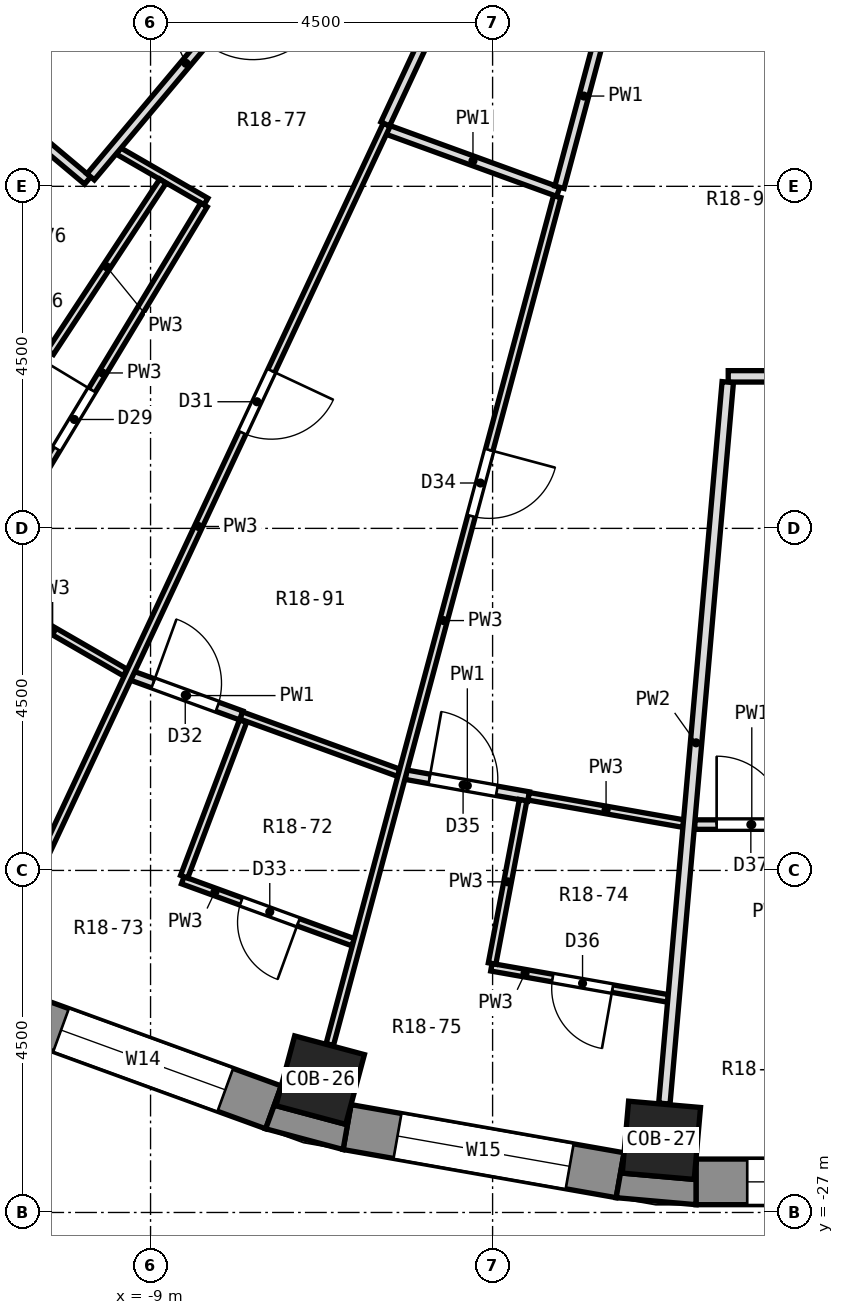
"""IFC4 building model, lengths in metres.
Left out: names, types, materials, properties, quantities, classifications, styles, units other than length and angle.
Written with IfcOpenShell. Run it as: python <this file> out.ifc"""

import sys

from ifc_helpers import new_model, si_unit, direction, frame, frame_2d, origin, origin_2d, place, context, subcontext, project, spatial, polyline, rectangle, outline, extrude, element, fill, save


model = new_model("IFC4")
c1 = context("Model", 3, precision=1e-05, world=origin(), true_north=direction((0.0, 1.0)))
c2 = subcontext(c1, "Body", "Model", "MODEL_VIEW")
j1 = project(units=[si_unit("LENGTHUNIT", "METRE"), si_unit("PLANEANGLEUNIT", "RADIAN")], contexts=[c1])
p1 = place(None, origin())
s1 = spatial("IfcSite", under=j1, at=p1, CompositionType="ELEMENT")
p2 = place(p1, origin())
s2 = spatial("IfcBuilding", under=s1, at=p2, CompositionType="ELEMENT")
p3 = place(p2, frame((0.0, 0.0, 101.8)))
s3 = spatial("IfcBuildingStorey", under=s2, at=p3, CompositionType="ELEMENT", Elevation=101.8)
for number, where, z_axis, x_axis in (
    (1, (-6.768, -25.259, 0.0), (0.0, 0.0, 1.0), (-0.259, -0.966, 0.0)),
    (2, (-2.279, -26.051, 0.0), (0.0, 0.0, 1.0), (-0.087, -0.996, 0.0)),
):
    element("IfcColumn", number, at=place(p3, frame(where, z_axis=z_axis, x_axis=x_axis)), inside=s3, PredefinedType="COLUMN", context=c2, shape_type="SweptSolid", body=[
        extrude(rectangle(XDim=0.95, YDim=0.95, at=origin_2d()), origin(), (0.0, 0.0, 1.0), 3.3),
    ])
p4 = place(p3, frame((-10.811, -24.369, 0.0), z_axis=(0.0, 0.0, 1.0), x_axis=(0.939703505393, -0.341990236633, 0.0)))
e3 = element("IfcWall", 3, at=p4, inside=s3, PredefinedType="SOLIDWALL", context=c2, shape_type="SweptSolid", body=[
    extrude(rectangle(XDim=3.648, YDim=0.6, at=frame_2d((1.824, 0.0))), origin(), (0.0, 0.0, 1.0), 2.8),
])
p5 = place(p4, frame((0.674, 0.0, 0.9)))
e4 = element("IfcOpeningElement", 4, at=p5, cuts=e3, PredefinedType="OPENING", context=c2, shape_type="SweptSolid", body=[
    extrude(rectangle(XDim=2.3, YDim=1.8, at=frame_2d((1.15, 0.9))), frame((0.0, 0.312, 0.0), z_axis=(0.0, -1.0, 0.0), x_axis=(1.0, 0.0, 0.0)), (0.0, 0.0, 1.0), 0.624),
])
p6 = place(p3, frame((-6.415, -25.876, 0.0), z_axis=(0.0, 0.0, 1.0), x_axis=(0.984803764455, -0.173670796382, 0.0)))
e5 = element("IfcWall", 5, at=p6, inside=s3, PredefinedType="SOLIDWALL", context=c2, shape_type="SweptSolid", body=[
    extrude(rectangle(XDim=3.648, YDim=0.6, at=frame_2d((1.824, 0.0))), origin(), (0.0, 0.0, 1.0), 2.8),
])
p7 = place(p6, frame((0.674, 0.0, 0.9)))
e6 = element("IfcOpeningElement", 6, at=p7, cuts=e5, PredefinedType="OPENING", context=c2, shape_type="SweptSolid", body=[
    extrude(rectangle(XDim=2.3, YDim=1.8, at=frame_2d((1.15, 0.9))), frame((0.0, 0.312, 0.0), z_axis=(0.0, -1.0, 0.0), x_axis=(1.0, 0.0, 0.0)), (0.0, 0.0, 1.0), 0.624),
])
p8 = place(p3, frame((-1.824, -26.597, 0.0), z_axis=(0.0, 0.0, 1.0), x_axis=(1.0, 0.0, 0.0)))
e7 = element("IfcWall", 7, at=p8, inside=s3, PredefinedType="SOLIDWALL", context=c2, shape_type="SweptSolid", body=[
    extrude(rectangle(XDim=3.648, YDim=0.6, at=frame_2d((1.824, 0.0))), origin(), (0.0, 0.0, 1.0), 2.8),
])
p9 = place(p8, frame((0.674, 0.0, 0.9)))
e8 = element("IfcOpeningElement", 8, at=p9, cuts=e7, PredefinedType="OPENING", context=c2, shape_type="SweptSolid", body=[
    extrude(rectangle(XDim=2.3, YDim=1.8, at=frame_2d((1.15, 0.9))), frame((0.0, 0.312, 0.0), z_axis=(0.0, -1.0, 0.0), x_axis=(1.0, 0.0, 0.0)), (0.0, 0.0, 1.0), 0.624),
])
p10 = place(p3, origin())
e9 = element("IfcWall", 9, at=p10, inside=s3, PredefinedType="SOLIDWALL", context=c2, shape_type="SweptSolid", body=[
    extrude(outline(polyline([(-7.486, -25.899), (-6.467, -26.172), (-6.363, -25.581), (-6.432, -25.841), (-7.35, -25.595), (-7.28, -25.335), (-7.486, -25.899)])), origin(), (0.0, 0.0, 1.0), 2.8),
])
p11 = place(p3, origin())
e10 = element("IfcWall", 10, at=p11, inside=s3, PredefinedType="SOLIDWALL", context=c2, shape_type="SweptSolid", body=[
    extrude(outline(polyline([(-2.875, -26.805), (-1.824, -26.897), (-1.824, -26.297), (-1.847, -26.565), (-2.794, -26.482), (-2.77, -26.215), (-2.875, -26.805)])), origin(), (0.0, 0.0, 1.0), 2.8),
])
p12 = place(p3, frame((-11.735, -11.823, 0.0), z_axis=(0.0, 0.0, 1.0), x_axis=(0.766013925241, -0.642823977724, 0.0)))
e11 = element("IfcWall", 11, at=p12, inside=s3, PredefinedType="PARTITIONING", context=c2, shape_type="SweptSolid", body=[
    extrude(rectangle(XDim=2.489, YDim=0.125, at=frame_2d((1.245, 0.0))), origin(), (0.0, 0.0, 1.0), 2.8),
])
p13 = place(p3, frame((-12.375, -20.796, 0.0), z_axis=(0.0, 0.0, 1.0), x_axis=(0.866037365989, -0.499979280282, 0.0)))
e12 = element("IfcWall", 12, at=p13, inside=s3, PredefinedType="PARTITIONING", context=c2, shape_type="SweptSolid", body=[
    extrude(rectangle(XDim=2.386, YDim=0.1, at=frame_2d((1.193, 0.0))), origin(), (0.0, 0.0, 1.0), 2.8),
])
p14 = place(p13, frame((0.818, 0.0, 0.0)))
e13 = element("IfcOpeningElement", 13, at=p14, cuts=e12, PredefinedType="OPENING", context=c2, shape_type="SweptSolid", body=[
    extrude(rectangle(XDim=0.8, YDim=2.1, at=frame_2d((0.4, 1.05))), frame((0.0, 0.062, 0.0), z_axis=(0.0, -1.0, 0.0), x_axis=(1.0, 0.0, 0.0)), (0.0, 0.0, 1.0), 0.124),
])
p15 = place(p3, frame((-11.242, -18.794, 0.0), z_axis=(0.0, 0.0, 1.0), x_axis=(0.866039875853, -0.499974932805, 0.0)))
e14 = element("IfcWall", 14, at=p15, inside=s3, PredefinedType="PARTITIONING", context=c2, shape_type="SweptSolid", body=[
    extrude(rectangle(XDim=2.204, YDim=0.1, at=frame_2d((1.102, 0.0))), origin(), (0.0, 0.0, 1.0), 2.8),
])
p16 = place(p3, frame((-9.422, -13.035, 0.0), z_axis=(0.0, 0.0, 1.0), x_axis=(0.866041828806, -0.499971549949, 0.0)))
e15 = element("IfcWall", 15, at=p16, inside=s3, PredefinedType="PARTITIONING", context=c2, shape_type="SweptSolid", body=[
    extrude(rectangle(XDim=1.329, YDim=0.1, at=frame_2d((0.665, 0.0))), origin(), (0.0, 0.0, 1.0), 2.8),
])
p17 = place(p3, frame((-8.576, -22.629, 0.0), z_axis=(0.0, 0.0, 1.0), x_axis=(0.939703758344, -0.341989541586, 0.0)))
e16 = element("IfcWall", 16, at=p17, inside=s3, PredefinedType="PARTITIONING", context=c2, shape_type="SweptSolid", body=[
    extrude(rectangle(XDim=2.386, YDim=0.1, at=frame_2d((1.193, 0.0))), origin(), (0.0, 0.0, 1.0), 2.8),
])
p18 = place(p17, frame((0.818, 0.0, 0.0)))
e17 = element("IfcOpeningElement", 17, at=p18, cuts=e16, PredefinedType="OPENING", context=c2, shape_type="SweptSolid", body=[
    extrude(rectangle(XDim=0.8, YDim=2.1, at=frame_2d((0.4, 1.05))), frame((0.0, 0.062, 0.0), z_axis=(0.0, -1.0, 0.0), x_axis=(1.0, 0.0, 0.0)), (0.0, 0.0, 1.0), 0.124),
])
p19 = place(p3, frame((-7.808, -20.461, 0.0), z_axis=(0.0, 0.0, 1.0), x_axis=(0.939728749343, -0.341920864613, 0.0)))
e18 = element("IfcWall", 18, at=p19, inside=s3, PredefinedType="PARTITIONING", context=c2, shape_type="SweptSolid", body=[
    extrude(rectangle(XDim=2.205, YDim=0.1, at=frame_2d((1.103, 0.0))), origin(), (0.0, 0.0, 1.0), 2.8),
])
p20 = place(p3, frame((-9.243, -19.938, 0.0), z_axis=(0.0, 0.0, 1.0), x_axis=(0.939611268692, -0.342243573711, 0.0)))
e19 = element("IfcWall", 19, at=p20, inside=s3, PredefinedType="PARTITIONING", context=c2, shape_type="SweptSolid", body=[
    extrude(rectangle(XDim=1.527, YDim=0.125, at=frame_2d((0.764, 0.0))), origin(), (0.0, 0.0, 1.0), 2.8),
])
p21 = place(p20, frame((0.294, 0.0, 0.0)))
e20 = element("IfcOpeningElement", 20, at=p21, cuts=e19, PredefinedType="OPENING", context=c2, shape_type="SweptSolid", body=[
    extrude(rectangle(XDim=0.9, YDim=2.1, at=frame_2d((0.45, 1.05))), frame((0.0, 0.074, 0.0), z_axis=(0.0, -1.0, 0.0), x_axis=(1.0, 0.0, 0.0)), (0.0, 0.0, 1.0), 0.149),
])
p22 = place(p3, frame((-5.879, -12.756, 0.0), z_axis=(0.0, 0.0, 1.0), x_axis=(0.939637973706, -0.342170247639, 0.0)))
e21 = element("IfcWall", 21, at=p22, inside=s3, PredefinedType="PARTITIONING", context=c2, shape_type="SweptSolid", body=[
    extrude(rectangle(XDim=2.386, YDim=0.125, at=frame_2d((1.193, 0.0))), origin(), (0.0, 0.0, 1.0), 2.8),
])
p23 = place(p3, frame((-5.64, -21.241, 0.0), z_axis=(0.0, 0.0, 1.0), x_axis=(0.984569921273, -0.174991628724, 0.0)))
e22 = element("IfcWall", 22, at=p23, inside=s3, PredefinedType="PARTITIONING", context=c2, shape_type="SweptSolid", body=[
    extrude(rectangle(XDim=1.639, YDim=0.125, at=frame_2d((0.82, 0.0))), origin(), (0.0, 0.0, 1.0), 2.8),
])
p24 = place(p23, frame((0.313, 0.0, 0.0)))
e23 = element("IfcOpeningElement", 23, at=p24, cuts=e22, PredefinedType="OPENING", context=c2, shape_type="SweptSolid", body=[
    extrude(rectangle(XDim=0.9, YDim=2.1, at=frame_2d((0.45, 1.05))), frame((0.0, 0.074, 0.0), z_axis=(0.0, -1.0, 0.0), x_axis=(1.0, 0.0, 0.0)), (0.0, 0.0, 1.0), 0.149),
])
p25 = place(p3, frame((-4.516, -23.774, 0.0), z_axis=(0.0, 0.0, 1.0), x_axis=(0.984810614942, -0.173631946077, 0.0)))
e24 = element("IfcWall", 24, at=p25, inside=s3, PredefinedType="PARTITIONING", context=c2, shape_type="SweptSolid", body=[
    extrude(rectangle(XDim=2.361, YDim=0.1, at=frame_2d((1.18, 0.0))), origin(), (0.0, 0.0, 1.0), 2.8),
])
p26 = place(p25, frame((0.818, 0.0, 0.0)))
e25 = element("IfcOpeningElement", 25, at=p26, cuts=e24, PredefinedType="OPENING", context=c2, shape_type="SweptSolid", body=[
    extrude(rectangle(XDim=0.8, YDim=2.1, at=frame_2d((0.4, 1.05))), frame((0.0, 0.062, 0.0), z_axis=(0.0, -1.0, 0.0), x_axis=(1.0, 0.0, 0.0)), (0.0, 0.0, 1.0), 0.124),
])
p27 = place(p3, frame((-4.025, -21.525, 0.0), z_axis=(0.0, 0.0, 1.0), x_axis=(0.984791880798, -0.173738169424, 0.0)))
e26 = element("IfcWall", 26, at=p27, inside=s3, PredefinedType="PARTITIONING", context=c2, shape_type="SweptSolid", body=[
    extrude(rectangle(XDim=2.067, YDim=0.1, at=frame_2d((1.034, 0.0))), origin(), (0.0, 0.0, 1.0), 2.8),
])
p28 = place(p3, frame((-1.841, -21.897, 0.0), z_axis=(0.0, 0.0, 1.0), x_axis=(1.0, 0.0, 0.0)))
e27 = element("IfcWall", 27, at=p28, inside=s3, PredefinedType="PARTITIONING", context=c2, shape_type="SweptSolid", body=[
    extrude(rectangle(XDim=1.502, YDim=0.125, at=frame_2d((0.751, 0.0))), origin(), (0.0, 0.0, 1.0), 2.8),
])
p29 = place(p28, frame((0.289, 0.0, 0.0)))
e28 = element("IfcOpeningElement", 28, at=p29, cuts=e27, PredefinedType="OPENING", context=c2, shape_type="SweptSolid", body=[
    extrude(rectangle(XDim=0.9, YDim=2.1, at=frame_2d((0.45, 1.05))), frame((0.0, 0.074, 0.0), z_axis=(0.0, -1.0, 0.0), x_axis=(1.0, 0.0, 0.0)), (0.0, 0.0, 1.0), 0.149),
])
p30 = place(p3, frame((-1.4, -16.0, 0.0), z_axis=(0.0, 0.0, 1.0), x_axis=(1.0, 0.0, 0.0)))
e29 = element("IfcWall", 29, at=p30, inside=s3, PredefinedType="PARTITIONING", context=c2, shape_type="SweptSolid", body=[
    extrude(rectangle(XDim=3.042, YDim=0.15, at=frame_2d((1.521, 0.0))), origin(), (0.0, 0.0, 1.0), 2.8),
])
p31 = place(p3, frame((-9.788, -13.375, 0.0), z_axis=(0.0, 0.0, 1.0), x_axis=(0.643234807085, 0.765668977401, 0.0)))
e30 = element("IfcWall", 30, at=p31, inside=s3, PredefinedType="PARTITIONING", context=c2, shape_type="SweptSolid", body=[
    extrude(rectangle(XDim=5.093, YDim=0.125, at=frame_2d((2.546, 0.0))), origin(), (0.0, 0.0, 1.0), 2.8),
])
p32 = place(p31, frame((2.32, 0.0, 0.0)))
e31 = element("IfcOpeningElement", 31, at=p32, cuts=e30, PredefinedType="OPENING", context=c2, shape_type="SweptSolid", body=[
    extrude(rectangle(XDim=1.0, YDim=2.1, at=frame_2d((0.5, 1.05))), frame((0.0, 0.074, 0.0), z_axis=(0.0, -1.0, 0.0), x_axis=(1.0, 0.0, 0.0)), (0.0, 0.0, 1.0), 0.149),
])
p33 = place(p3, frame((-11.473, -11.961, 0.0), z_axis=(0.0, 0.0, 1.0), x_axis=(0.642813583638, 0.766022647636, 0.0)))
e32 = element("IfcWall", 32, at=p33, inside=s3, PredefinedType="PARTITIONING", context=c2, shape_type="SweptSolid", body=[
    extrude(rectangle(XDim=3.904, YDim=0.125, at=frame_2d((1.952, 0.0))), origin(), (0.0, 0.0, 1.0), 2.8),
])
p34 = place(p3, frame((-10.319, -15.684, 0.0), z_axis=(0.0, 0.0, 1.0), x_axis=(0.549631473795, 0.835407231842, 0.0)))
e33 = element("IfcWall", 33, at=p34, inside=s3, PredefinedType="PARTITIONING", context=c2, shape_type="SweptSolid", body=[
    extrude(rectangle(XDim=2.695, YDim=0.1, at=frame_2d((1.348, 0.0))), origin(), (0.0, 0.0, 1.0), 2.8),
])
p35 = place(p3, frame((-11.287, -18.695, 0.0), z_axis=(0.0, 0.0, 1.0), x_axis=(0.516964841348, 0.856006631288, 0.0)))
e34 = element("IfcWall", 34, at=p35, inside=s3, PredefinedType="PARTITIONING", context=c2, shape_type="SweptSolid", body=[
    extrude(rectangle(XDim=5.782, YDim=0.1, at=frame_2d((2.891, 0.0))), origin(), (0.0, 0.0, 1.0), 2.8),
])
p36 = place(p35, frame((2.035, 0.0, 0.0)))
e35 = element("IfcOpeningElement", 35, at=p36, cuts=e34, PredefinedType="OPENING", context=c2, shape_type="SweptSolid", body=[
    extrude(rectangle(XDim=0.9, YDim=2.1, at=frame_2d((0.45, 1.05))), frame((0.0, 0.062, 0.0), z_axis=(0.0, -1.0, 0.0), x_axis=(1.0, 0.0, 0.0)), (0.0, 0.0, 1.0), 0.124),
])
p37 = place(p3, frame((-10.845, -23.261, 0.0), z_axis=(0.0, 0.0, 1.0), x_axis=(0.424206154739, 0.905565645484, 0.0)))
e36 = element("IfcWall", 36, at=p37, inside=s3, PredefinedType="PARTITIONING", context=c2, shape_type="SweptSolid", body=[
    extrude(rectangle(XDim=11.675, YDim=0.1, at=frame_2d((5.837, 0.0))), origin(), (0.0, 0.0, 1.0), 2.8),
])
p38 = place(p37, frame((7.199, 0.0, 0.0)))
e37 = element("IfcOpeningElement", 37, at=p38, cuts=e36, PredefinedType="OPENING", context=c2, shape_type="SweptSolid", body=[
    extrude(rectangle(XDim=0.9, YDim=2.1, at=frame_2d((0.45, 1.05))), frame((0.0, 0.062, 0.0), z_axis=(0.0, -1.0, 0.0), x_axis=(1.0, 0.0, 0.0)), (0.0, 0.0, 1.0), 0.124),
])
p39 = place(p3, frame((-5.913, -12.68, 0.0), z_axis=(0.0, 0.0, 1.0), x_axis=(0.422627539676, 0.906303460606, 0.0)))
e38 = element("IfcWall", 38, at=p39, inside=s3, PredefinedType="PARTITIONING", context=c2, shape_type="SweptSolid", body=[
    extrude(rectangle(XDim=2.488, YDim=0.125, at=frame_2d((1.244, 0.0))), origin(), (0.0, 0.0, 1.0), 2.8),
])
p40 = place(p3, frame((-8.558, -22.582, 0.0), z_axis=(0.0, 0.0, 1.0), x_axis=(0.35430099241, 0.935131438236, 0.0)))
e39 = element("IfcWall", 39, at=p40, inside=s3, PredefinedType="PARTITIONING", context=c2, shape_type="SweptSolid", body=[
    extrude(rectangle(XDim=2.188, YDim=0.1, at=frame_2d((1.094, 0.0))), origin(), (0.0, 0.0, 1.0), 2.8),
])
p41 = place(p3, frame((-6.642, -24.791, 0.0), z_axis=(0.0, 0.0, 1.0), x_axis=(0.259103074619, 0.965849676049, 0.0)))
e40 = element("IfcWall", 40, at=p41, inside=s3, PredefinedType="PARTITIONING", context=c2, shape_type="SweptSolid", body=[
    extrude(rectangle(XDim=11.549, YDim=0.1, at=frame_2d((5.774, 0.0))), origin(), (0.0, 0.0, 1.0), 2.8),
])
p42 = place(p41, frame((7.199, 0.0, 0.0)))
e41 = element("IfcOpeningElement", 41, at=p42, cuts=e40, PredefinedType="OPENING", context=c2, shape_type="SweptSolid", body=[
    extrude(rectangle(XDim=0.9, YDim=2.1, at=frame_2d((0.45, 1.05))), frame((0.0, 0.062, 0.0), z_axis=(0.0, -1.0, 0.0), x_axis=(1.0, 0.0, 0.0)), (0.0, 0.0, 1.0), 0.124),
])
p43 = place(p3, frame((-3.62, -13.512, 0.0), z_axis=(0.0, 0.0, 1.0), x_axis=(0.258641119931, 0.965973483632, 0.0)))
e42 = element("IfcWall", 42, at=p43, inside=s3, PredefinedType="PARTITIONING", context=c2, shape_type="SweptSolid", body=[
    extrude(rectangle(XDim=2.484, YDim=0.125, at=frame_2d((1.242, 0.0))), origin(), (0.0, 0.0, 1.0), 2.8),
])
p44 = place(p3, frame((-4.507, -23.725, 0.0), z_axis=(0.0, 0.0, 1.0), x_axis=(0.186471082638, 0.982460449759, 0.0)))
e43 = element("IfcWall", 43, at=p44, inside=s3, PredefinedType="PARTITIONING", context=c2, shape_type="SweptSolid", body=[
    extrude(rectangle(XDim=2.188, YDim=0.1, at=frame_2d((1.094, 0.0))), origin(), (0.0, 0.0, 1.0), 2.8),
])
p45 = place(p3, frame((-2.24, -25.567, 0.0), z_axis=(0.0, 0.0, 1.0), x_axis=(0.087555048891, 0.996159682688, 0.0)))
e44 = element("IfcWall", 44, at=p45, inside=s3, PredefinedType="PARTITIONING", context=c2, shape_type="SweptSolid", body=[
    extrude(rectangle(XDim=9.528, YDim=0.15, at=frame_2d((4.764, 0.0))), origin(), (0.0, 0.0, 1.0), 2.8),
])
p46 = place(p5, origin())
e45 = element("IfcWindow", 45, at=p46, inside=s3, PartitioningType="SINGLE_PANEL", PredefinedType="WINDOW", context=c2, shape_type="SweptSolid", body=[
    extrude(rectangle(XDim=2.3, YDim=1.8, at=frame_2d((1.15, 0.9))), frame((0.0, 0.18, 0.0), z_axis=(0.0, -1.0, 0.0), x_axis=(1.0, 0.0, 0.0)), (0.0, 0.0, 1.0), 0.06),
])
fill(e4, e45)
p47 = place(p7, origin())
e46 = element("IfcWindow", 46, at=p47, inside=s3, PartitioningType="SINGLE_PANEL", PredefinedType="WINDOW", context=c2, shape_type="SweptSolid", body=[
    extrude(rectangle(XDim=2.3, YDim=1.8, at=frame_2d((1.15, 0.9))), frame((0.0, 0.18, 0.0), z_axis=(0.0, -1.0, 0.0), x_axis=(1.0, 0.0, 0.0)), (0.0, 0.0, 1.0), 0.06),
])
fill(e6, e46)
p48 = place(p9, origin())
e47 = element("IfcWindow", 47, at=p48, inside=s3, PartitioningType="SINGLE_PANEL", PredefinedType="WINDOW", context=c2, shape_type="SweptSolid", body=[
    extrude(rectangle(XDim=2.3, YDim=1.8, at=frame_2d((1.15, 0.9))), frame((0.0, 0.18, 0.0), z_axis=(0.0, -1.0, 0.0), x_axis=(1.0, 0.0, 0.0)), (0.0, 0.0, 1.0), 0.06),
])
fill(e8, e47)
p49 = place(p36, origin())
e48 = element("IfcDoor", 48, at=p49, inside=s3, OperationType="SINGLE_SWING_RIGHT", PredefinedType="DOOR", context=c2, shape_type="SweptSolid", body=[
    extrude(rectangle(XDim=0.9, YDim=2.1, at=frame_2d((0.45, 1.05))), frame((0.0, 0.025, 0.0), z_axis=(0.0, -1.0, 0.0), x_axis=(1.0, 0.0, 0.0)), (0.0, 0.0, 1.0), 0.05),
])
fill(e35, e48)
p50 = place(p38, frame((0.9, 0.0, 0.0), z_axis=(0.0, 0.0, 1.0), x_axis=(-1.0, 0.0, 0.0)))
e49 = element("IfcDoor", 49, at=p50, inside=s3, OperationType="SINGLE_SWING_LEFT", PredefinedType="DOOR", context=c2, shape_type="SweptSolid", body=[
    extrude(rectangle(XDim=0.9, YDim=2.1, at=frame_2d((0.45, 1.05))), frame((0.0, 0.025, 0.0), z_axis=(0.0, -1.0, 0.0), x_axis=(1.0, 0.0, 0.0)), (0.0, 0.0, 1.0), 0.05),
])
fill(e37, e49)
p51 = place(p21, origin())
e50 = element("IfcDoor", 50, at=p51, inside=s3, OperationType="SINGLE_SWING_LEFT", PredefinedType="DOOR", context=c2, shape_type="SweptSolid", body=[
    extrude(rectangle(XDim=0.9, YDim=2.1, at=frame_2d((0.45, 1.05))), frame((0.0, 0.025, 0.0), z_axis=(0.0, -1.0, 0.0), x_axis=(1.0, 0.0, 0.0)), (0.0, 0.0, 1.0), 0.05),
])
fill(e20, e50)
p52 = place(p18, frame((0.8, 0.0, 0.0), z_axis=(0.0, 0.0, 1.0), x_axis=(-1.0, 0.0, 0.0)))
e51 = element("IfcDoor", 51, at=p52, inside=s3, OperationType="SINGLE_SWING_LEFT", PredefinedType="DOOR", context=c2, shape_type="SweptSolid", body=[
    extrude(rectangle(XDim=0.8, YDim=2.1, at=frame_2d((0.4, 1.05))), frame((0.0, 0.025, 0.0), z_axis=(0.0, -1.0, 0.0), x_axis=(1.0, 0.0, 0.0)), (0.0, 0.0, 1.0), 0.05),
])
fill(e17, e51)
p53 = place(p42, frame((0.9, 0.0, 0.0), z_axis=(0.0, 0.0, 1.0), x_axis=(-1.0, 0.0, 0.0)))
e52 = element("IfcDoor", 52, at=p53, inside=s3, OperationType="SINGLE_SWING_LEFT", PredefinedType="DOOR", context=c2, shape_type="SweptSolid", body=[
    extrude(rectangle(XDim=0.9, YDim=2.1, at=frame_2d((0.45, 1.05))), frame((0.0, 0.025, 0.0), z_axis=(0.0, -1.0, 0.0), x_axis=(1.0, 0.0, 0.0)), (0.0, 0.0, 1.0), 0.05),
])
fill(e41, e52)
p54 = place(p24, origin())
e53 = element("IfcDoor", 53, at=p54, inside=s3, OperationType="SINGLE_SWING_LEFT", PredefinedType="DOOR", context=c2, shape_type="SweptSolid", body=[
    extrude(rectangle(XDim=0.9, YDim=2.1, at=frame_2d((0.45, 1.05))), frame((0.0, 0.025, 0.0), z_axis=(0.0, -1.0, 0.0), x_axis=(1.0, 0.0, 0.0)), (0.0, 0.0, 1.0), 0.05),
])
fill(e23, e53)
p55 = place(p26, frame((0.8, 0.0, 0.0), z_axis=(0.0, 0.0, 1.0), x_axis=(-1.0, 0.0, 0.0)))
e54 = element("IfcDoor", 54, at=p55, inside=s3, OperationType="SINGLE_SWING_LEFT", PredefinedType="DOOR", context=c2, shape_type="SweptSolid", body=[
    extrude(rectangle(XDim=0.8, YDim=2.1, at=frame_2d((0.4, 1.05))), frame((0.0, 0.025, 0.0), z_axis=(0.0, -1.0, 0.0), x_axis=(1.0, 0.0, 0.0)), (0.0, 0.0, 1.0), 0.05),
])
fill(e25, e54)
p56 = place(p29, origin())
e55 = element("IfcDoor", 55, at=p56, inside=s3, OperationType="SINGLE_SWING_LEFT", PredefinedType="DOOR", context=c2, shape_type="SweptSolid", body=[
    extrude(rectangle(XDim=0.9, YDim=2.1, at=frame_2d((0.45, 1.05))), frame((0.0, 0.025, 0.0), z_axis=(0.0, -1.0, 0.0), x_axis=(1.0, 0.0, 0.0)), (0.0, 0.0, 1.0), 0.05),
])
fill(e28, e55)
save(model, sys.argv[1])
